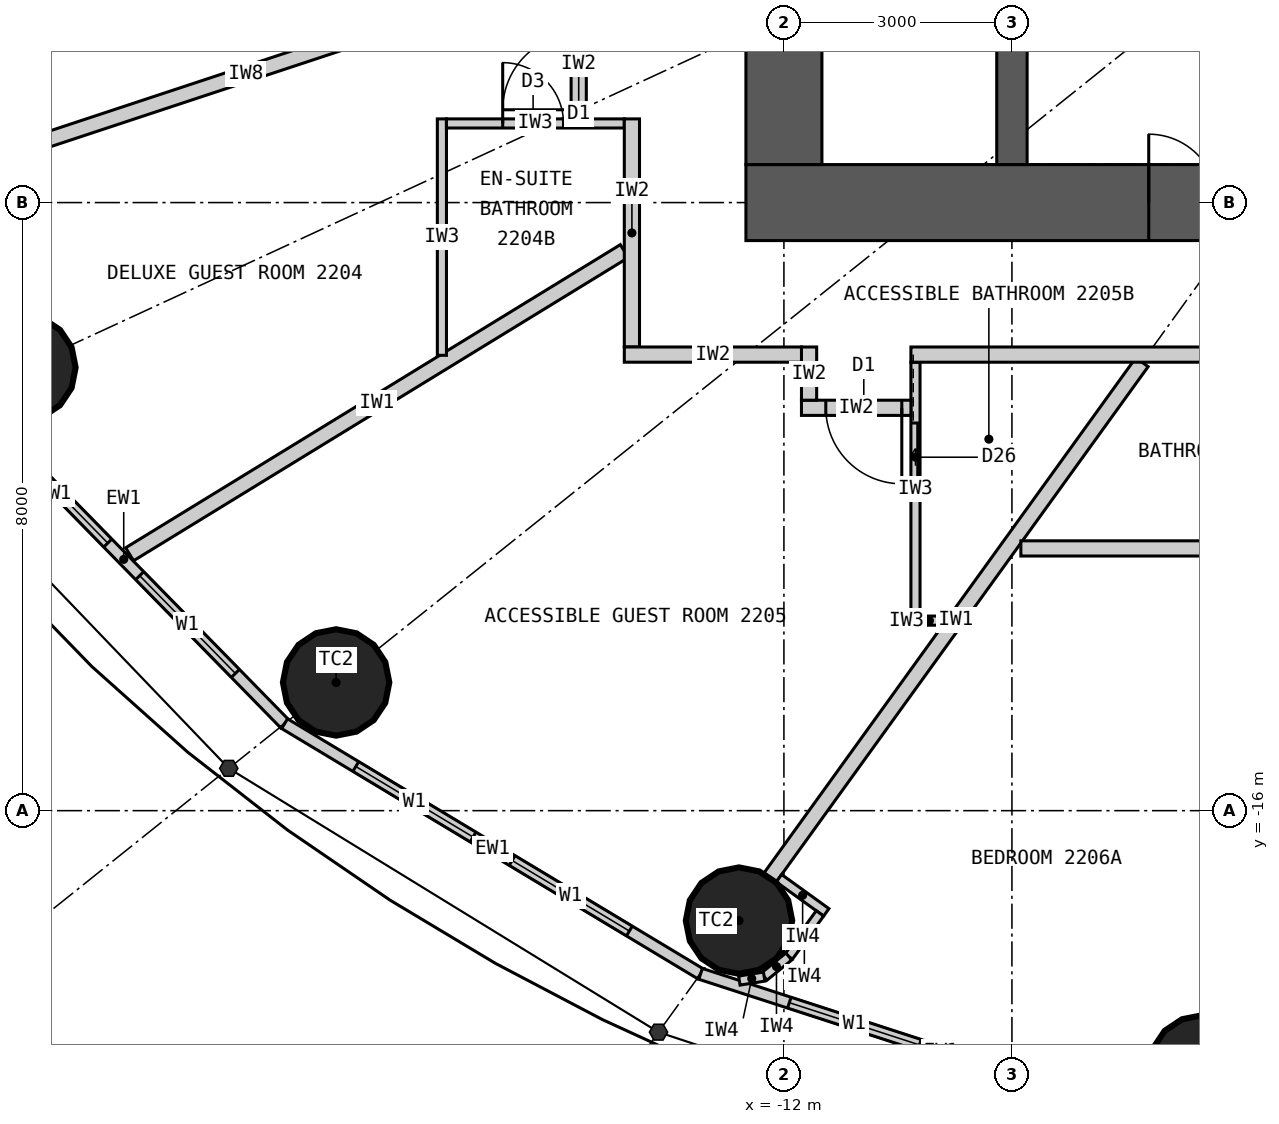
"""IFC4 building model, lengths in metres.
Left out: names, types, materials, properties, quantities, classifications, styles, units other than length and angle.
Written with IfcOpenShell. Run it as: python <this file> out.ifc"""

import sys

from ifc_helpers import new_model, si_unit, direction, frame, frame_2d, origin, origin_2d, place, context, subcontext, project, spatial, rectangle, circle, extrude, element, fill, save


model = new_model("IFC4")
c1 = context("Model", 3, precision=1e-05, world=origin(), true_north=direction((0.0, 1.0)))
c2 = subcontext(c1, "Body", "Model", "MODEL_VIEW")
j1 = project(units=[si_unit("LENGTHUNIT", "METRE"), si_unit("PLANEANGLEUNIT", "RADIAN")], contexts=[c1])
p1 = place(None, origin())
s1 = spatial("IfcSite", under=j1, at=p1, CompositionType="ELEMENT")
p2 = place(p1, origin())
s2 = spatial("IfcBuilding", under=s1, at=p2, CompositionType="ELEMENT")
p3 = place(p2, frame((0.0, 0.0, 87.0)))
s3 = spatial("IfcBuildingStorey", under=s2, at=p3, CompositionType="ELEMENT", Elevation=87.0)
for number, where, z_axis, x_axis in (
    (1, (-22.019, -10.17, 0.0), (0.0, 0.0, 1.0), (1.0, 0.0, 0.0)),
    (2, (-17.892, -14.313, 0.0), (0.0, 0.0, 1.0), (1.0, 0.0, 0.0)),
    (3, (-12.591, -17.447, 0.0), (0.0, 0.0, 1.0), (1.0, 0.0, 0.0)),
    (4, (-6.495, -19.391, 0.0), (0.0, 0.0, 1.0), (1.0, 0.0, 0.0)),
):
    element("IfcColumn", number, at=place(p3, frame(where, z_axis=z_axis, x_axis=x_axis)), inside=s3, PredefinedType="COLUMN", context=c2, shape_type="SweptSolid", body=[
        extrude(circle(Radius=0.7, at=origin_2d()), origin(), (0.0, 0.0, 1.0), 3.3),
    ])
p4 = place(p3, frame((12.5, -8.0, 0.0), z_axis=(0.0, 0.0, 1.0), x_axis=(-1.0, 0.0, 0.0)))
e5 = element("IfcWall", 5, at=p4, inside=s3, PredefinedType="SHEAR", context=c2, shape_type="SweptSolid", body=[
    extrude(rectangle(XDim=25.0, YDim=1.0, at=frame_2d((12.5, 0.0))), origin(), (0.0, 0.0, 1.0), 3.3),
])
p5 = place(p4, frame((11.2, 0.0, 0.0)))
e6 = element("IfcOpeningElement", 6, at=p5, cuts=e5, PredefinedType="OPENING", context=c2, shape_type="SweptSolid", body=[
    extrude(rectangle(XDim=1.2, YDim=2.2, at=frame_2d((0.6, 1.1))), frame((0.0, 0.51, 0.0), z_axis=(0.0, -1.0, 0.0), x_axis=(1.0, 0.0, 0.0)), (0.0, 0.0, 1.0), 1.02),
])
p6 = place(p4, frame((18.8, 0.0, 0.0)))
e7 = element("IfcOpeningElement", 7, at=p6, cuts=e5, PredefinedType="OPENING", context=c2, shape_type="SweptSolid", body=[
    extrude(rectangle(XDim=0.9, YDim=2.2, at=frame_2d((0.45, 1.1))), frame((0.0, 0.51, 0.0), z_axis=(0.0, -1.0, 0.0), x_axis=(1.0, 0.0, 0.0)), (0.0, 0.0, 1.0), 1.02),
])
p7 = place(p3, frame((-12.0, 7.5, 0.0), z_axis=(0.0, 0.0, 1.0), x_axis=(0.0, -1.0, 0.0)))
e8 = element("IfcWall", 8, at=p7, inside=s3, PredefinedType="SHEAR", context=c2, shape_type="SweptSolid", body=[
    extrude(rectangle(XDim=15.0, YDim=1.0, at=frame_2d((7.5, 0.0))), origin(), (0.0, 0.0, 1.0), 3.3),
])
p8 = place(p7, frame((6.6, 0.0, 0.0)))
e9 = element("IfcOpeningElement", 9, at=p8, cuts=e8, PredefinedType="OPENING", context=c2, shape_type="SweptSolid", body=[
    extrude(rectangle(XDim=1.8, YDim=2.2, at=frame_2d((0.9, 1.1))), frame((0.0, 0.51, 0.0), z_axis=(0.0, -1.0, 0.0), x_axis=(1.0, 0.0, 0.0)), (0.0, 0.0, 1.0), 1.02),
])
p9 = place(p3, frame((-9.0, -7.5, 0.0), z_axis=(0.0, 0.0, 1.0), x_axis=(0.0, 1.0, 0.0)))
e10 = element("IfcWall", 10, at=p9, inside=s3, PredefinedType="SHEAR", context=c2, shape_type="SweptSolid", body=[
    extrude(rectangle(XDim=3.0, YDim=0.4, at=frame_2d((1.5, 0.0))), origin(), (0.0, 0.0, 1.0), 3.3),
])
p10 = place(p3, frame((-22.803, -10.532, 0.0), z_axis=(0.0, 0.0, 1.0), x_axis=(0.699602905915, -0.714531856557, 0.0)))
e11 = element("IfcWall", 11, at=p10, inside=s3, PredefinedType="ELEMENTEDWALL", context=c2, shape_type="SweptSolid", body=[
    extrude(rectangle(XDim=6.051, YDim=0.15, at=frame_2d((3.025, 0.0))), origin(), (0.0, 0.0, 1.0), 3.12),
])
p11 = place(p10, frame((0.926, 0.0, 0.9)))
e12 = element("IfcOpeningElement", 12, at=p11, cuts=e11, PredefinedType="OPENING", context=c2, shape_type="SweptSolid", body=[
    extrude(rectangle(XDim=1.8, YDim=1.9, at=frame_2d((0.9, 0.95))), frame((0.0, 0.085, 0.0), z_axis=(0.0, -1.0, 0.0), x_axis=(1.0, 0.0, 0.0)), (0.0, 0.0, 1.0), 0.17),
])
p12 = place(p10, frame((3.325, 0.0, 0.9)))
e13 = element("IfcOpeningElement", 13, at=p12, cuts=e11, PredefinedType="OPENING", context=c2, shape_type="SweptSolid", body=[
    extrude(rectangle(XDim=1.8, YDim=1.9, at=frame_2d((0.9, 0.95))), frame((0.0, 0.085, 0.0), z_axis=(0.0, -1.0, 0.0), x_axis=(1.0, 0.0, 0.0)), (0.0, 0.0, 1.0), 0.17),
])
p13 = place(p3, frame((-18.57, -14.856, 0.0), z_axis=(0.0, 0.0, 1.0), x_axis=(0.856983180864, -0.515344377787, 0.0)))
e14 = element("IfcWall", 14, at=p13, inside=s3, PredefinedType="ELEMENTEDWALL", context=c2, shape_type="SweptSolid", body=[
    extrude(rectangle(XDim=6.386, YDim=0.15, at=frame_2d((3.193, 0.0))), origin(), (0.0, 0.0, 1.0), 3.12),
])
p14 = place(p13, frame((1.093, 0.0, 0.9)))
e15 = element("IfcOpeningElement", 15, at=p14, cuts=e14, PredefinedType="OPENING", context=c2, shape_type="SweptSolid", body=[
    extrude(rectangle(XDim=1.8, YDim=1.9, at=frame_2d((0.9, 0.95))), frame((0.0, 0.085, 0.0), z_axis=(0.0, -1.0, 0.0), x_axis=(1.0, 0.0, 0.0)), (0.0, 0.0, 1.0), 0.17),
])
p15 = place(p13, frame((3.493, 0.0, 0.9)))
e16 = element("IfcOpeningElement", 16, at=p15, cuts=e14, PredefinedType="OPENING", context=c2, shape_type="SweptSolid", body=[
    extrude(rectangle(XDim=1.8, YDim=1.9, at=frame_2d((0.9, 0.95))), frame((0.0, 0.085, 0.0), z_axis=(0.0, -1.0, 0.0), x_axis=(1.0, 0.0, 0.0)), (0.0, 0.0, 1.0), 0.17),
])
p16 = place(p3, frame((-13.096, -18.147, 0.0), z_axis=(0.0, 0.0, 1.0), x_axis=(0.951137534625, -0.308767534285, 0.0)))
e17 = element("IfcWall", 17, at=p16, inside=s3, PredefinedType="ELEMENTEDWALL", context=c2, shape_type="SweptSolid", body=[
    extrude(rectangle(XDim=6.655, YDim=0.15, at=frame_2d((3.328, 0.0))), origin(), (0.0, 0.0, 1.0), 3.12),
])
p17 = place(p16, frame((1.228, 0.0, 0.9)))
e18 = element("IfcOpeningElement", 18, at=p17, cuts=e17, PredefinedType="OPENING", context=c2, shape_type="SweptSolid", body=[
    extrude(rectangle(XDim=1.8, YDim=1.9, at=frame_2d((0.9, 0.95))), frame((0.0, 0.085, 0.0), z_axis=(0.0, -1.0, 0.0), x_axis=(1.0, 0.0, 0.0)), (0.0, 0.0, 1.0), 0.17),
])
p18 = place(p16, frame((3.628, 0.0, 0.9)))
e19 = element("IfcOpeningElement", 19, at=p18, cuts=e17, PredefinedType="OPENING", context=c2, shape_type="SweptSolid", body=[
    extrude(rectangle(XDim=1.8, YDim=1.9, at=frame_2d((0.9, 0.95))), frame((0.0, 0.085, 0.0), z_axis=(0.0, -1.0, 0.0), x_axis=(1.0, 0.0, 0.0)), (0.0, 0.0, 1.0), 0.17),
])
p19 = place(p3, frame((-14.1, -4.663, 0.0), z_axis=(0.0, 0.0, 1.0), x_axis=(-0.949432655039, -0.31397075269, 0.0)))
e20 = element("IfcWall", 20, at=p19, inside=s3, PredefinedType="PARTITIONING", context=c2, shape_type="SweptSolid", body=[
    extrude(rectangle(XDim=10.486, YDim=0.2, at=frame_2d((5.243, 0.0))), origin(), (0.0, 0.0, 1.0), 3.12),
])
p20 = place(p3, frame((-14.1, -8.639, 0.0), z_axis=(0.0, 0.0, 1.0), x_axis=(-0.852672493023, -0.522445805459, 0.0)))
e21 = element("IfcWall", 21, at=p20, inside=s3, PredefinedType="PARTITIONING", context=c2, shape_type="SweptSolid", body=[
    extrude(rectangle(XDim=7.633, YDim=0.2, at=frame_2d((3.817, 0.0))), origin(), (0.0, 0.0, 1.0), 3.12),
])
p21 = place(p3, frame((-7.289, -10.1, 0.0), z_axis=(0.0, 0.0, 1.0), x_axis=(-0.585198353053, -0.810890182197, 0.0)))
e22 = element("IfcWall", 22, at=p21, inside=s3, PredefinedType="PARTITIONING", context=c2, shape_type="SweptSolid", body=[
    extrude(rectangle(XDim=8.36, YDim=0.2, at=frame_2d((4.18, 0.0))), origin(), (0.0, 0.0, 1.0), 2.27),
])
p22 = place(p3, frame((-16.5, -10.01, 0.0), z_axis=(0.0, 0.0, 1.0), x_axis=(0.0, 1.0, 0.0)))
e23 = element("IfcWall", 23, at=p22, inside=s3, PredefinedType="PARTITIONING", context=c2, shape_type="SweptSolid", body=[
    extrude(rectangle(XDim=3.111, YDim=0.12, at=frame_2d((1.555, 0.0))), origin(), (0.0, 0.0, 1.0), 3.12),
])
p23 = place(p3, frame((-14.1, -6.959, 0.0), z_axis=(0.0, 0.0, 1.0), x_axis=(-1.0, 0.0, 0.0)))
e24 = element("IfcWall", 24, at=p23, inside=s3, PredefinedType="PARTITIONING", context=c2, shape_type="SweptSolid", body=[
    extrude(rectangle(XDim=2.34, YDim=0.12, at=frame_2d((1.17, 0.0))), origin(), (0.0, 0.0, 1.0), 3.12),
])
p24 = place(p23, frame((0.8, 0.0, 0.0)))
e25 = element("IfcOpeningElement", 25, at=p24, cuts=e24, PredefinedType="OPENING", context=c2, shape_type="SweptSolid", body=[
    extrude(rectangle(XDim=0.8, YDim=2.1, at=frame_2d((0.4, 1.05))), frame((0.0, 0.07, 0.0), z_axis=(0.0, -1.0, 0.0), x_axis=(1.0, 0.0, 0.0)), (0.0, 0.0, 1.0), 0.14),
])
p25 = place(p3, frame((-9.843, -13.5, 0.0), z_axis=(0.0, 0.0, 1.0), x_axis=(-1.0, 0.0, 0.0)))
e26 = element("IfcWall", 26, at=p25, inside=s3, PredefinedType="PARTITIONING", context=c2, shape_type="SweptSolid", body=[
    extrude(rectangle(XDim=0.486, YDim=0.12, at=frame_2d((0.243, 0.0))), origin(), (0.0, 0.0, 1.0), 3.12),
])
p26 = place(p3, frame((-10.269, -10.1, 0.0), z_axis=(0.0, 0.0, 1.0), x_axis=(0.0, -1.0, 0.0)))
e27 = element("IfcWall", 27, at=p26, inside=s3, PredefinedType="PARTITIONING", context=c2, shape_type="SweptSolid", body=[
    extrude(rectangle(XDim=3.34, YDim=0.12, at=frame_2d((1.67, 0.0))), origin(), (0.0, 0.0, 1.0), 3.12),
])
p27 = place(p26, frame((0.8, 0.0, 0.0)))
e28 = element("IfcOpeningElement", 28, at=p27, cuts=e27, PredefinedType="OPENING", context=c2, shape_type="SweptSolid", body=[
    extrude(rectangle(XDim=0.9, YDim=2.1, at=frame_2d((0.45, 1.05))), frame((0.0, 0.07, 0.0), z_axis=(0.0, -1.0, 0.0), x_axis=(1.0, 0.0, 0.0)), (0.0, 0.0, 1.0), 0.14),
])
p28 = place(p3, frame((-8.883, -12.55, 0.0), z_axis=(0.0, 0.0, 1.0), x_axis=(1.0, 0.0, 0.0)))
e29 = element("IfcWall", 29, at=p28, inside=s3, PredefinedType="PARTITIONING", context=c2, shape_type="SweptSolid", body=[
    extrude(rectangle(XDim=17.765, YDim=0.2, at=frame_2d((8.883, 0.0))), origin(), (0.0, 0.0, 1.0), 3.12),
])
p29 = place(p28, frame((3.42, 0.0, 0.0)))
e30 = element("IfcOpeningElement", 30, at=p29, cuts=e29, PredefinedType="OPENING", context=c2, shape_type="SweptSolid", body=[
    extrude(rectangle(XDim=0.8, YDim=2.1, at=frame_2d((0.4, 1.05))), frame((0.0, 0.11, 0.0), z_axis=(0.0, -1.0, 0.0), x_axis=(1.0, 0.0, 0.0)), (0.0, 0.0, 1.0), 0.22),
])
p30 = place(p28, frame((13.52, 0.0, 0.0)))
e31 = element("IfcOpeningElement", 31, at=p30, cuts=e29, PredefinedType="OPENING", context=c2, shape_type="SweptSolid", body=[
    extrude(rectangle(XDim=0.8, YDim=2.1, at=frame_2d((0.4, 1.05))), frame((0.0, 0.11, 0.0), z_axis=(0.0, -1.0, 0.0), x_axis=(1.0, 0.0, 0.0)), (0.0, 0.0, 1.0), 0.22),
])
p31 = place(p28, frame((8.42, 0.0, 0.0)))
e32 = element("IfcOpeningElement", 32, at=p31, cuts=e29, PredefinedType="OPENING", context=c2, shape_type="SweptSolid", body=[
    extrude(rectangle(XDim=0.9, YDim=2.1, at=frame_2d((0.45, 1.05))), frame((0.0, 0.11, 0.0), z_axis=(0.0, -1.0, 0.0), x_axis=(1.0, 0.0, 0.0)), (0.0, 0.0, 1.0), 0.22),
])
p32 = place(p3, frame((-14.7, -5.459, 0.0), z_axis=(0.0, 0.0, 1.0), x_axis=(0.0, -1.0, 0.0)))
e33 = element("IfcWall", 33, at=p32, inside=s3, PredefinedType="PARTITIONING", context=c2, shape_type="SweptSolid", body=[
    extrude(rectangle(XDim=1.44, YDim=0.2, at=frame_2d((0.72, 0.0))), origin(), (0.0, 0.0, 1.0), 3.12),
])
p33 = place(p32, frame((0.32, 0.0, 0.0)))
e34 = element("IfcOpeningElement", 34, at=p33, cuts=e33, PredefinedType="OPENING", context=c2, shape_type="SweptSolid", body=[
    extrude(rectangle(XDim=1.0, YDim=2.2, at=frame_2d((0.5, 1.1))), frame((0.0, 0.11, 0.0), z_axis=(0.0, -1.0, 0.0), x_axis=(1.0, 0.0, 0.0)), (0.0, 0.0, 1.0), 0.22),
])
p34 = place(p3, frame((-10.329, -10.7, 0.0), z_axis=(0.0, 0.0, 1.0), x_axis=(-1.0, 0.0, 0.0)))
e35 = element("IfcWall", 35, at=p34, inside=s3, PredefinedType="PARTITIONING", context=c2, shape_type="SweptSolid", body=[
    extrude(rectangle(XDim=1.44, YDim=0.2, at=frame_2d((0.72, 0.0))), origin(), (0.0, 0.0, 1.0), 3.12),
])
p35 = place(p34, frame((0.12, 0.0, 0.0)))
e36 = element("IfcOpeningElement", 36, at=p35, cuts=e35, PredefinedType="OPENING", context=c2, shape_type="SweptSolid", body=[
    extrude(rectangle(XDim=1.0, YDim=2.2, at=frame_2d((0.5, 1.1))), frame((0.0, 0.11, 0.0), z_axis=(0.0, -1.0, 0.0), x_axis=(1.0, 0.0, 0.0)), (0.0, 0.0, 1.0), 0.22),
])
p36 = place(p3, frame((-11.669, -9.9, 0.0), z_axis=(0.0, 0.0, 1.0), x_axis=(0.0, -1.0, 0.0)))
e37 = element("IfcWall", 37, at=p36, inside=s3, PredefinedType="PARTITIONING", context=c2, shape_type="SweptSolid", body=[
    extrude(rectangle(XDim=0.7, YDim=0.2, at=frame_2d((0.35, 0.0))), origin(), (0.0, 0.0, 1.0), 3.12),
])
p37 = place(p3, frame((-14.0, -6.899, 0.0), z_axis=(0.0, 0.0, 1.0), x_axis=(0.0, -1.0, 0.0)))
e38 = element("IfcWall", 38, at=p37, inside=s3, PredefinedType="PARTITIONING", context=c2, shape_type="SweptSolid", body=[
    extrude(rectangle(XDim=3.001, YDim=0.2, at=frame_2d((1.5, 0.0))), origin(), (0.0, 0.0, 1.0), 3.12),
])
p38 = place(p3, frame((14.1, -10.0, 0.0), z_axis=(0.0, 0.0, 1.0), x_axis=(-1.0, 0.0, 0.0)))
e39 = element("IfcWall", 39, at=p38, inside=s3, PredefinedType="PARTITIONING", context=c2, shape_type="SweptSolid", body=[
    extrude(rectangle(XDim=24.429, YDim=0.2, at=frame_2d((12.215, 0.0))), origin(), (0.0, 0.0, 1.0), 3.12),
])
p39 = place(p38, frame((13.597, 0.0, 0.0)))
e40 = element("IfcOpeningElement", 40, at=p39, cuts=e39, PredefinedType="OPENING", context=c2, shape_type="SweptSolid", body=[
    extrude(rectangle(XDim=1.0, YDim=2.2, at=frame_2d((0.5, 1.1))), frame((0.0, 0.11, 0.0), z_axis=(0.0, -1.0, 0.0), x_axis=(1.0, 0.0, 0.0)), (0.0, 0.0, 1.0), 0.22),
])
p40 = place(p3, frame((-11.769, -10.0, 0.0), z_axis=(0.0, 0.0, 1.0), x_axis=(-1.0, 0.0, 0.0)))
e41 = element("IfcWall", 41, at=p40, inside=s3, PredefinedType="PARTITIONING", context=c2, shape_type="SweptSolid", body=[
    extrude(rectangle(XDim=2.331, YDim=0.2, at=frame_2d((1.166, 0.0))), origin(), (0.0, 0.0, 1.0), 3.12),
])
p41 = place(p3, frame((-12.065, -16.889, 0.0), z_axis=(0.0, 0.0, 1.0), x_axis=(0.810821798253, -0.585293098778, 0.0)))
e42 = element("IfcWall", 42, at=p41, inside=s3, PredefinedType="PARTITIONING", context=c2, shape_type="SweptSolid", body=[
    extrude(rectangle(XDim=0.768, YDim=0.12, at=frame_2d((0.384, 0.0))), origin(), (0.0, 0.0, 1.0), 3.12),
])
p42 = place(p3, frame((-11.526, -17.351, 0.0), z_axis=(0.0, 0.0, 1.0), x_axis=(-0.585223113993, -0.810872312296, 0.0)))
e43 = element("IfcWall", 43, at=p42, inside=s3, PredefinedType="PARTITIONING", context=c2, shape_type="SweptSolid", body=[
    extrude(rectangle(XDim=0.7, YDim=0.12, at=frame_2d((0.35, 0.0))), origin(), (0.0, 0.0, 1.0), 3.12),
])
p43 = place(p3, frame((-11.936, -17.919, 0.0), z_axis=(0.0, 0.0, 1.0), x_axis=(-0.775023088441, -0.631932917629, 0.0)))
e44 = element("IfcWall", 44, at=p43, inside=s3, PredefinedType="PARTITIONING", context=c2, shape_type="SweptSolid", body=[
    extrude(rectangle(XDim=0.418, YDim=0.12, at=frame_2d((0.209, 0.0))), origin(), (0.0, 0.0, 1.0), 3.12),
])
p44 = place(p3, frame((-12.26, -18.183, 0.0), z_axis=(0.0, 0.0, 1.0), x_axis=(-0.987218661664, -0.159371622511, 0.0)))
e45 = element("IfcWall", 45, at=p44, inside=s3, PredefinedType="PARTITIONING", context=c2, shape_type="SweptSolid", body=[
    extrude(rectangle(XDim=0.331, YDim=0.12, at=frame_2d((0.166, 0.0))), origin(), (0.0, 0.0, 1.0), 3.12),
])
p45 = place(p11, origin())
e46 = element("IfcWindow", 46, at=p45, inside=s3, PartitioningType="SINGLE_PANEL", PredefinedType="WINDOW", context=c2, shape_type="SweptSolid", body=[
    extrude(rectangle(XDim=1.8, YDim=1.9, at=frame_2d((0.9, 0.95))), frame((0.0, 0.03, 0.0), z_axis=(0.0, -1.0, 0.0), x_axis=(1.0, 0.0, 0.0)), (0.0, 0.0, 1.0), 0.06),
])
fill(e12, e46)
p46 = place(p12, origin())
e47 = element("IfcWindow", 47, at=p46, inside=s3, PartitioningType="SINGLE_PANEL", PredefinedType="WINDOW", context=c2, shape_type="SweptSolid", body=[
    extrude(rectangle(XDim=1.8, YDim=1.9, at=frame_2d((0.9, 0.95))), frame((0.0, 0.03, 0.0), z_axis=(0.0, -1.0, 0.0), x_axis=(1.0, 0.0, 0.0)), (0.0, 0.0, 1.0), 0.06),
])
fill(e13, e47)
p47 = place(p14, origin())
e48 = element("IfcWindow", 48, at=p47, inside=s3, PartitioningType="SINGLE_PANEL", PredefinedType="WINDOW", context=c2, shape_type="SweptSolid", body=[
    extrude(rectangle(XDim=1.8, YDim=1.9, at=frame_2d((0.9, 0.95))), frame((0.0, 0.03, 0.0), z_axis=(0.0, -1.0, 0.0), x_axis=(1.0, 0.0, 0.0)), (0.0, 0.0, 1.0), 0.06),
])
fill(e15, e48)
p48 = place(p15, origin())
e49 = element("IfcWindow", 49, at=p48, inside=s3, PartitioningType="SINGLE_PANEL", PredefinedType="WINDOW", context=c2, shape_type="SweptSolid", body=[
    extrude(rectangle(XDim=1.8, YDim=1.9, at=frame_2d((0.9, 0.95))), frame((0.0, 0.03, 0.0), z_axis=(0.0, -1.0, 0.0), x_axis=(1.0, 0.0, 0.0)), (0.0, 0.0, 1.0), 0.06),
])
fill(e16, e49)
p49 = place(p17, origin())
e50 = element("IfcWindow", 50, at=p49, inside=s3, PartitioningType="SINGLE_PANEL", PredefinedType="WINDOW", context=c2, shape_type="SweptSolid", body=[
    extrude(rectangle(XDim=1.8, YDim=1.9, at=frame_2d((0.9, 0.95))), frame((0.0, 0.03, 0.0), z_axis=(0.0, -1.0, 0.0), x_axis=(1.0, 0.0, 0.0)), (0.0, 0.0, 1.0), 0.06),
])
fill(e18, e50)
p50 = place(p24, origin())
e51 = element("IfcDoor", 51, at=p50, inside=s3, OperationType="SINGLE_SWING_RIGHT", PredefinedType="DOOR", context=c2, shape_type="SweptSolid", body=[
    extrude(rectangle(XDim=0.8, YDim=2.1, at=frame_2d((0.4, 1.05))), frame((0.0, 0.025, 0.0), z_axis=(0.0, -1.0, 0.0), x_axis=(1.0, 0.0, 0.0)), (0.0, 0.0, 1.0), 0.05),
])
fill(e25, e51)
p51 = place(p33, origin())
e52 = element("IfcDoor", 52, at=p51, inside=s3, OperationType="SINGLE_SWING_RIGHT", PredefinedType="DOOR", context=c2, shape_type="SweptSolid", body=[
    extrude(rectangle(XDim=1.0, YDim=2.2, at=frame_2d((0.5, 1.1))), frame((0.0, 0.025, 0.0), z_axis=(0.0, -1.0, 0.0), x_axis=(1.0, 0.0, 0.0)), (0.0, 0.0, 1.0), 0.05),
])
fill(e34, e52)
p52 = place(p27, origin())
e53 = element("IfcDoor", 53, at=p52, inside=s3, OperationType="SLIDING_TO_LEFT", PredefinedType="DOOR", context=c2, shape_type="SweptSolid", body=[
    extrude(rectangle(XDim=0.9, YDim=2.1, at=frame_2d((0.45, 1.05))), frame((0.0, 0.025, 0.0), z_axis=(0.0, -1.0, 0.0), x_axis=(1.0, 0.0, 0.0)), (0.0, 0.0, 1.0), 0.05),
])
fill(e28, e53)
p53 = place(p35, origin())
e54 = element("IfcDoor", 54, at=p53, inside=s3, OperationType="SINGLE_SWING_LEFT", PredefinedType="DOOR", context=c2, shape_type="SweptSolid", body=[
    extrude(rectangle(XDim=1.0, YDim=2.2, at=frame_2d((0.5, 1.1))), frame((0.0, 0.025, 0.0), z_axis=(0.0, -1.0, 0.0), x_axis=(1.0, 0.0, 0.0)), (0.0, 0.0, 1.0), 0.05),
])
fill(e36, e54)
p54 = place(p6, origin())
e55 = element("IfcDoor", 55, at=p54, inside=s3, OperationType="SINGLE_SWING_RIGHT", PredefinedType="DOOR", context=c2, shape_type="SweptSolid", body=[
    extrude(rectangle(XDim=0.9, YDim=2.2, at=frame_2d((0.45, 1.1))), frame((0.0, 0.025, 0.0), z_axis=(0.0, -1.0, 0.0), x_axis=(1.0, 0.0, 0.0)), (0.0, 0.0, 1.0), 0.05),
])
fill(e7, e55)
save(model, sys.argv[1])
